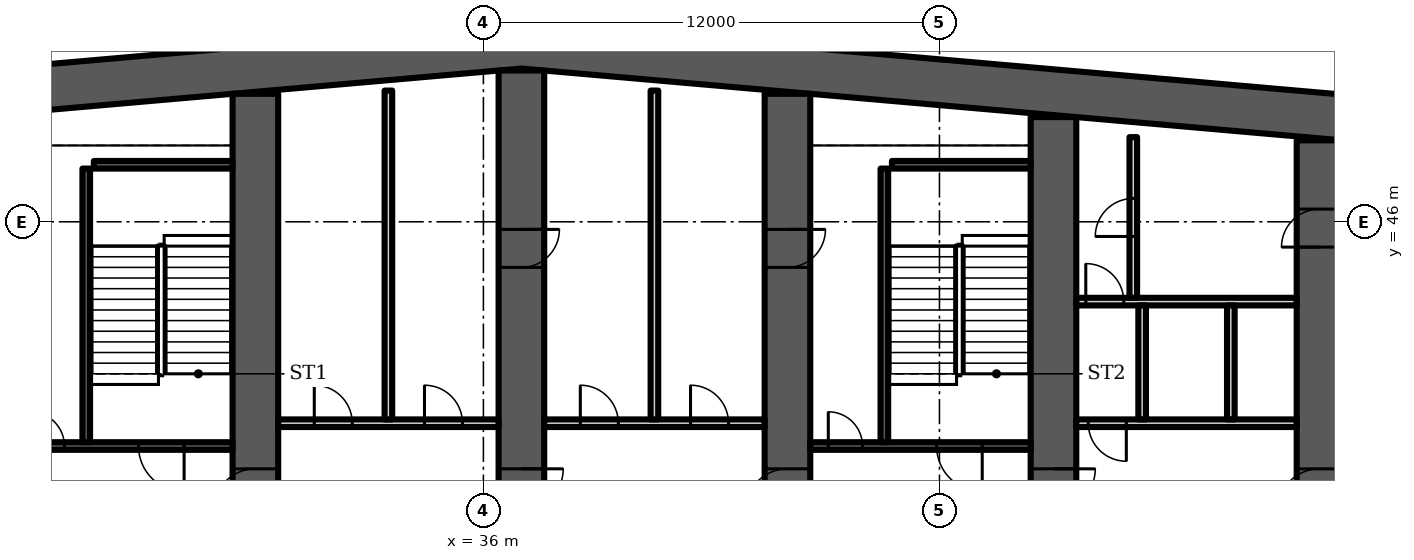
"""IFC4 building model, lengths in metres.
Left out: names, types, materials, properties, quantities, classifications, styles, units other than length and angle.
Written with IfcOpenShell. Run it as: python <this file> out.ifc"""

import sys

from ifc_helpers import new_model, si_unit, direction, frame, frame_2d, origin, place, context, subcontext, project, spatial, polyline, rectangle, outline, extrude, element, fill, save


model = new_model("IFC4")
c1 = context("Model", 3, precision=1e-05, world=origin(), true_north=direction((0.0, 1.0)))
c2 = subcontext(c1, "Body", "Model", "MODEL_VIEW")
j1 = project(units=[si_unit("LENGTHUNIT", "METRE"), si_unit("PLANEANGLEUNIT", "RADIAN")], contexts=[c1])
p1 = place(None, origin())
s1 = spatial("IfcSite", under=j1, at=p1, CompositionType="ELEMENT")
p2 = place(p1, origin())
s2 = spatial("IfcBuilding", under=s1, at=p2, CompositionType="ELEMENT")
p3 = place(p2, frame((0.0, 0.0, 91.9)))
s3 = spatial("IfcBuildingStorey", under=s2, at=p3, CompositionType="ELEMENT", Elevation=91.9)
p4 = place(p3, origin())
e1 = element("IfcWall", 1, at=p4, inside=s3, PredefinedType="SHEAR", context=c2, shape_type="SweptSolid", body=[
    extrude(outline(polyline([(9.0, 47.583), (37.0, 50.032), (65.0, 47.583), (65.0, 48.787), (37.0, 51.237), (9.0, 48.787), (9.0, 47.583)])), origin(), (0.0, 0.0, 1.0), 4.8),
])
p5 = place(p3, frame((30.0, 35.2, 0.0), z_axis=(0.0, 0.0, 1.0), x_axis=(0.0, 1.0, 0.0)))
e2 = element("IfcWall", 2, at=p5, inside=s3, PredefinedType="SHEAR", context=c2, shape_type="SweptSolid", body=[
    extrude(rectangle(XDim=14.168, YDim=1.2, at=frame_2d((7.084, 0.0))), origin(), (0.0, 0.0, 1.0), 4.8),
])
p6 = place(p5, frame((3.2, 0.0, 0.0)))
e3 = element("IfcOpeningElement", 3, at=p6, cuts=e2, PredefinedType="OPENING", context=c2, shape_type="SweptSolid", body=[
    extrude(rectangle(XDim=1.1, YDim=2.1, at=frame_2d((0.55, 1.05))), frame((0.0, 0.61, 0.0), z_axis=(0.0, -1.0, 0.0), x_axis=(1.0, 0.0, 0.0)), (0.0, 0.0, 1.0), 1.22),
])
p7 = place(p3, frame((37.0, 35.2, 0.0), z_axis=(0.0, 0.0, 1.0), x_axis=(0.0, 1.0, 0.0)))
e4 = element("IfcWall", 4, at=p7, inside=s3, PredefinedType="SHEAR", context=c2, shape_type="SweptSolid", body=[
    extrude(rectangle(XDim=14.78, YDim=1.2, at=frame_2d((7.39, 0.0))), origin(), (0.0, 0.0, 1.0), 4.8),
])
p8 = place(p7, frame((3.2, 0.0, 0.0)))
e5 = element("IfcOpeningElement", 5, at=p8, cuts=e4, PredefinedType="OPENING", context=c2, shape_type="SweptSolid", body=[
    extrude(rectangle(XDim=1.1, YDim=2.1, at=frame_2d((0.55, 1.05))), frame((0.0, 0.61, 0.0), z_axis=(0.0, -1.0, 0.0), x_axis=(1.0, 0.0, 0.0)), (0.0, 0.0, 1.0), 1.22),
])
p9 = place(p7, frame((9.6, 0.0, 0.0)))
e6 = element("IfcOpeningElement", 6, at=p9, cuts=e4, PredefinedType="OPENING", context=c2, shape_type="SweptSolid", body=[
    extrude(rectangle(XDim=1.0, YDim=2.1, at=frame_2d((0.5, 1.05))), frame((0.0, 0.61, 0.0), z_axis=(0.0, -1.0, 0.0), x_axis=(1.0, 0.0, 0.0)), (0.0, 0.0, 1.0), 1.22),
])
p10 = place(p3, frame((44.0, 35.2, 0.0), z_axis=(0.0, 0.0, 1.0), x_axis=(0.0, 1.0, 0.0)))
e7 = element("IfcWall", 7, at=p10, inside=s3, PredefinedType="SHEAR", context=c2, shape_type="SweptSolid", body=[
    extrude(rectangle(XDim=14.168, YDim=1.2, at=frame_2d((7.084, 0.0))), origin(), (0.0, 0.0, 1.0), 4.8),
])
p11 = place(p10, frame((3.2, 0.0, 0.0)))
e8 = element("IfcOpeningElement", 8, at=p11, cuts=e7, PredefinedType="OPENING", context=c2, shape_type="SweptSolid", body=[
    extrude(rectangle(XDim=1.1, YDim=2.1, at=frame_2d((0.55, 1.05))), frame((0.0, 0.61, 0.0), z_axis=(0.0, -1.0, 0.0), x_axis=(1.0, 0.0, 0.0)), (0.0, 0.0, 1.0), 1.22),
])
p12 = place(p10, frame((9.6, 0.0, 0.0)))
e9 = element("IfcOpeningElement", 9, at=p12, cuts=e7, PredefinedType="OPENING", context=c2, shape_type="SweptSolid", body=[
    extrude(rectangle(XDim=1.0, YDim=2.1, at=frame_2d((0.5, 1.05))), frame((0.0, 0.61, 0.0), z_axis=(0.0, -1.0, 0.0), x_axis=(1.0, 0.0, 0.0)), (0.0, 0.0, 1.0), 1.22),
])
p13 = place(p3, frame((51.0, 35.2, 0.0), z_axis=(0.0, 0.0, 1.0), x_axis=(0.0, 1.0, 0.0)))
e10 = element("IfcWall", 10, at=p13, inside=s3, PredefinedType="SHEAR", context=c2, shape_type="SweptSolid", body=[
    extrude(rectangle(XDim=13.555, YDim=1.2, at=frame_2d((6.778, 0.0))), origin(), (0.0, 0.0, 1.0), 4.8),
])
p14 = place(p13, frame((3.2, 0.0, 0.0)))
e11 = element("IfcOpeningElement", 11, at=p14, cuts=e10, PredefinedType="OPENING", context=c2, shape_type="SweptSolid", body=[
    extrude(rectangle(XDim=1.1, YDim=2.1, at=frame_2d((0.55, 1.05))), frame((0.0, 0.61, 0.0), z_axis=(0.0, -1.0, 0.0), x_axis=(1.0, 0.0, 0.0)), (0.0, 0.0, 1.0), 1.22),
])
p15 = place(p3, frame((58.0, 35.2, 0.0), z_axis=(0.0, 0.0, 1.0), x_axis=(0.0, 1.0, 0.0)))
e12 = element("IfcWall", 12, at=p15, inside=s3, PredefinedType="SHEAR", context=c2, shape_type="SweptSolid", body=[
    extrude(rectangle(XDim=12.943, YDim=1.2, at=frame_2d((6.471, 0.0))), origin(), (0.0, 0.0, 1.0), 4.8),
])
p16 = place(p15, frame((10.134, 0.0, 0.0)))
e13 = element("IfcOpeningElement", 13, at=p16, cuts=e12, PredefinedType="OPENING", context=c2, shape_type="SweptSolid", body=[
    extrude(rectangle(XDim=1.0, YDim=2.1, at=frame_2d((0.5, 1.05))), frame((0.0, 0.61, 0.0), z_axis=(0.0, -1.0, 0.0), x_axis=(1.0, 0.0, 0.0)), (0.0, 0.0, 1.0), 1.22),
])
p17 = place(p15, frame((3.2, 0.0, 0.0)))
e14 = element("IfcOpeningElement", 14, at=p17, cuts=e12, PredefinedType="OPENING", context=c2, shape_type="SweptSolid", body=[
    extrude(rectangle(XDim=1.1, YDim=2.1, at=frame_2d((0.55, 1.05))), frame((0.0, 0.61, 0.0), z_axis=(0.0, -1.0, 0.0), x_axis=(1.0, 0.0, 0.0)), (0.0, 0.0, 1.0), 1.22),
])
p18 = place(p3, frame((23.6, 40.1, 0.0), z_axis=(0.0, 0.0, 1.0), x_axis=(1.0, 0.0, 0.0)))
e15 = element("IfcWall", 15, at=p18, inside=s3, PredefinedType="SHEAR", context=c2, shape_type="SweptSolid", body=[
    extrude(rectangle(XDim=5.8, YDim=0.2, at=frame_2d((2.9, 0.0))), origin(), (0.0, 0.0, 1.0), 4.4),
])
p19 = place(p18, frame((3.325, 0.0, 0.0)))
e16 = element("IfcOpeningElement", 16, at=p19, cuts=e15, PredefinedType="OPENING", context=c2, shape_type="SweptSolid", body=[
    extrude(rectangle(XDim=1.2, YDim=2.1, at=frame_2d((0.6, 1.05))), frame((0.0, 0.11, 0.0), z_axis=(0.0, -1.0, 0.0), x_axis=(1.0, 0.0, 0.0)), (0.0, 0.0, 1.0), 0.22),
])
p20 = place(p18, frame((0.475, 0.0, 0.0)))
e17 = element("IfcOpeningElement", 17, at=p20, cuts=e15, PredefinedType="OPENING", context=c2, shape_type="SweptSolid", body=[
    extrude(rectangle(XDim=0.9, YDim=2.1, at=frame_2d((0.45, 1.05))), frame((0.0, 0.11, 0.0), z_axis=(0.0, -1.0, 0.0), x_axis=(1.0, 0.0, 0.0)), (0.0, 0.0, 1.0), 0.22),
])
p21 = place(p3, frame((25.55, 40.2, 0.0), z_axis=(0.0, 0.0, 1.0), x_axis=(0.0, 1.0, 0.0)))
e18 = element("IfcWall", 18, at=p21, inside=s3, PredefinedType="SHEAR", context=c2, shape_type="SweptSolid", body=[
    extrude(rectangle(XDim=7.2, YDim=0.2, at=frame_2d((3.6, 0.0))), origin(), (0.0, 0.0, 1.0), 4.4),
])
p22 = place(p3, frame((25.75, 47.5, 0.0), z_axis=(0.0, 0.0, 1.0), x_axis=(1.0, 0.0, 0.0)))
e19 = element("IfcWall", 19, at=p22, inside=s3, PredefinedType="SHEAR", context=c2, shape_type="SweptSolid", body=[
    extrude(rectangle(XDim=3.65, YDim=0.2, at=frame_2d((1.825, 0.0))), origin(), (0.0, 0.0, 1.0), 4.4),
])
p23 = place(p3, frame((30.6, 40.7, 0.0), z_axis=(0.0, 0.0, 1.0), x_axis=(1.0, 0.0, 0.0)))
e20 = element("IfcWall", 20, at=p23, inside=s3, PredefinedType="PARTITIONING", context=c2, shape_type="SweptSolid", body=[
    extrude(rectangle(XDim=5.8, YDim=0.2, at=frame_2d((2.9, 0.0))), origin(), (0.0, 0.0, 1.0), 4.4),
])
p24 = place(p23, frame((0.95, 0.0, 0.0)))
e21 = element("IfcOpeningElement", 21, at=p24, cuts=e20, PredefinedType="OPENING", context=c2, shape_type="SweptSolid", body=[
    extrude(rectangle(XDim=1.0, YDim=2.1, at=frame_2d((0.5, 1.05))), frame((0.0, 0.11, 0.0), z_axis=(0.0, -1.0, 0.0), x_axis=(1.0, 0.0, 0.0)), (0.0, 0.0, 1.0), 0.22),
])
p25 = place(p23, frame((3.85, 0.0, 0.0)))
e22 = element("IfcOpeningElement", 22, at=p25, cuts=e20, PredefinedType="OPENING", context=c2, shape_type="SweptSolid", body=[
    extrude(rectangle(XDim=1.0, YDim=2.1, at=frame_2d((0.5, 1.05))), frame((0.0, 0.11, 0.0), z_axis=(0.0, -1.0, 0.0), x_axis=(1.0, 0.0, 0.0)), (0.0, 0.0, 1.0), 0.22),
])
p26 = place(p3, frame((33.5, 40.8, 0.0), z_axis=(0.0, 0.0, 1.0), x_axis=(0.0, 1.0, 0.0)))
e23 = element("IfcWall", 23, at=p26, inside=s3, PredefinedType="PARTITIONING", context=c2, shape_type="SweptSolid", body=[
    extrude(rectangle(XDim=8.653, YDim=0.2, at=frame_2d((4.326, 0.0))), origin(), (0.0, 0.0, 1.0), 4.4),
])
p27 = place(p3, frame((37.6, 40.7, 0.0), z_axis=(0.0, 0.0, 1.0), x_axis=(1.0, 0.0, 0.0)))
e24 = element("IfcWall", 24, at=p27, inside=s3, PredefinedType="PARTITIONING", context=c2, shape_type="SweptSolid", body=[
    extrude(rectangle(XDim=5.8, YDim=0.2, at=frame_2d((2.9, 0.0))), origin(), (0.0, 0.0, 1.0), 4.4),
])
p28 = place(p27, frame((0.95, 0.0, 0.0)))
e25 = element("IfcOpeningElement", 25, at=p28, cuts=e24, PredefinedType="OPENING", context=c2, shape_type="SweptSolid", body=[
    extrude(rectangle(XDim=1.0, YDim=2.1, at=frame_2d((0.5, 1.05))), frame((0.0, 0.11, 0.0), z_axis=(0.0, -1.0, 0.0), x_axis=(1.0, 0.0, 0.0)), (0.0, 0.0, 1.0), 0.22),
])
p29 = place(p27, frame((3.85, 0.0, 0.0)))
e26 = element("IfcOpeningElement", 26, at=p29, cuts=e24, PredefinedType="OPENING", context=c2, shape_type="SweptSolid", body=[
    extrude(rectangle(XDim=1.0, YDim=2.1, at=frame_2d((0.5, 1.05))), frame((0.0, 0.11, 0.0), z_axis=(0.0, -1.0, 0.0), x_axis=(1.0, 0.0, 0.0)), (0.0, 0.0, 1.0), 0.22),
])
p30 = place(p3, frame((40.5, 40.8, 0.0), z_axis=(0.0, 0.0, 1.0), x_axis=(0.0, 1.0, 0.0)))
e27 = element("IfcWall", 27, at=p30, inside=s3, PredefinedType="PARTITIONING", context=c2, shape_type="SweptSolid", body=[
    extrude(rectangle(XDim=8.653, YDim=0.2, at=frame_2d((4.326, 0.0))), origin(), (0.0, 0.0, 1.0), 4.4),
])
p31 = place(p3, frame((44.6, 40.1, 0.0), z_axis=(0.0, 0.0, 1.0), x_axis=(1.0, 0.0, 0.0)))
e28 = element("IfcWall", 28, at=p31, inside=s3, PredefinedType="SHEAR", context=c2, shape_type="SweptSolid", body=[
    extrude(rectangle(XDim=5.8, YDim=0.2, at=frame_2d((2.9, 0.0))), origin(), (0.0, 0.0, 1.0), 4.4),
])
p32 = place(p31, frame((3.325, 0.0, 0.0)))
e29 = element("IfcOpeningElement", 29, at=p32, cuts=e28, PredefinedType="OPENING", context=c2, shape_type="SweptSolid", body=[
    extrude(rectangle(XDim=1.2, YDim=2.1, at=frame_2d((0.6, 1.05))), frame((0.0, 0.11, 0.0), z_axis=(0.0, -1.0, 0.0), x_axis=(1.0, 0.0, 0.0)), (0.0, 0.0, 1.0), 0.22),
])
p33 = place(p31, frame((0.475, 0.0, 0.0)))
e30 = element("IfcOpeningElement", 30, at=p33, cuts=e28, PredefinedType="OPENING", context=c2, shape_type="SweptSolid", body=[
    extrude(rectangle(XDim=0.9, YDim=2.1, at=frame_2d((0.45, 1.05))), frame((0.0, 0.11, 0.0), z_axis=(0.0, -1.0, 0.0), x_axis=(1.0, 0.0, 0.0)), (0.0, 0.0, 1.0), 0.22),
])
p34 = place(p3, frame((46.55, 40.2, 0.0), z_axis=(0.0, 0.0, 1.0), x_axis=(0.0, 1.0, 0.0)))
e31 = element("IfcWall", 31, at=p34, inside=s3, PredefinedType="SHEAR", context=c2, shape_type="SweptSolid", body=[
    extrude(rectangle(XDim=7.2, YDim=0.2, at=frame_2d((3.6, 0.0))), origin(), (0.0, 0.0, 1.0), 4.4),
])
p35 = place(p3, frame((46.75, 47.5, 0.0), z_axis=(0.0, 0.0, 1.0), x_axis=(1.0, 0.0, 0.0)))
e32 = element("IfcWall", 32, at=p35, inside=s3, PredefinedType="SHEAR", context=c2, shape_type="SweptSolid", body=[
    extrude(rectangle(XDim=3.65, YDim=0.2, at=frame_2d((1.825, 0.0))), origin(), (0.0, 0.0, 1.0), 4.4),
])
p36 = place(p3, frame((51.6, 40.7, 0.0), z_axis=(0.0, 0.0, 1.0), x_axis=(1.0, 0.0, 0.0)))
e33 = element("IfcWall", 33, at=p36, inside=s3, PredefinedType="PARTITIONING", context=c2, shape_type="SweptSolid", body=[
    extrude(rectangle(XDim=5.8, YDim=0.2, at=frame_2d((2.9, 0.0))), origin(), (0.0, 0.0, 1.0), 4.4),
])
p37 = place(p36, frame((0.317, 0.0, 0.0)))
e34 = element("IfcOpeningElement", 34, at=p37, cuts=e33, PredefinedType="OPENING", context=c2, shape_type="SweptSolid", body=[
    extrude(rectangle(XDim=1.0, YDim=2.1, at=frame_2d((0.5, 1.05))), frame((0.0, 0.11, 0.0), z_axis=(0.0, -1.0, 0.0), x_axis=(1.0, 0.0, 0.0)), (0.0, 0.0, 1.0), 0.22),
])
p38 = place(p3, frame((51.6, 43.9, 0.0), z_axis=(0.0, 0.0, 1.0), x_axis=(1.0, 0.0, 0.0)))
e35 = element("IfcWall", 35, at=p38, inside=s3, PredefinedType="PARTITIONING", context=c2, shape_type="SweptSolid", body=[
    extrude(rectangle(XDim=5.8, YDim=0.2, at=frame_2d((2.9, 0.0))), origin(), (0.0, 0.0, 1.0), 4.4),
])
p39 = place(p38, frame((0.25, 0.0, 0.0)))
e36 = element("IfcOpeningElement", 36, at=p39, cuts=e35, PredefinedType="OPENING", context=c2, shape_type="SweptSolid", body=[
    extrude(rectangle(XDim=1.0, YDim=2.1, at=frame_2d((0.5, 1.05))), frame((0.0, 0.11, 0.0), z_axis=(0.0, -1.0, 0.0), x_axis=(1.0, 0.0, 0.0)), (0.0, 0.0, 1.0), 0.22),
])
p40 = place(p3, origin())
e37 = element("IfcWall", 37, at=p40, inside=s3, PredefinedType="PARTITIONING", context=c2, shape_type="SweptSolid", body=[
    extrude(outline(polyline([(53.233, 40.8), (53.233, 43.8), (53.433, 43.8), (53.433, 40.8), (53.233, 40.8)])), origin(), (0.0, 0.0, 1.0), 4.4),
])
p41 = place(p3, origin())
e38 = element("IfcWall", 38, at=p41, inside=s3, PredefinedType="PARTITIONING", context=c2, shape_type="SweptSolid", body=[
    extrude(outline(polyline([(55.567, 40.8), (55.567, 43.8), (55.767, 43.8), (55.767, 40.8), (55.567, 40.8)])), origin(), (0.0, 0.0, 1.0), 4.4),
])
p42 = place(p3, frame((53.1, 44.0, 0.0), z_axis=(0.0, 0.0, 1.0), x_axis=(0.0, 1.0, 0.0)))
e39 = element("IfcWall", 39, at=p42, inside=s3, PredefinedType="PARTITIONING", context=c2, shape_type="SweptSolid", body=[
    extrude(rectangle(XDim=4.228, YDim=0.2, at=frame_2d((2.114, 0.0))), origin(), (0.0, 0.0, 1.0), 4.4),
])
p43 = place(p42, frame((1.614, 0.0, 0.0)))
e40 = element("IfcOpeningElement", 40, at=p43, cuts=e39, PredefinedType="OPENING", context=c2, shape_type="SweptSolid", body=[
    extrude(rectangle(XDim=1.0, YDim=2.1, at=frame_2d((0.5, 1.05))), frame((0.0, 0.11, 0.0), z_axis=(0.0, -1.0, 0.0), x_axis=(1.0, 0.0, 0.0)), (0.0, 0.0, 1.0), 0.22),
])
p44 = place(p19, origin())
e41 = element("IfcDoor", 41, at=p44, inside=s3, OperationType="SINGLE_SWING_RIGHT", PredefinedType="DOOR", context=c2, shape_type="SweptSolid", body=[
    extrude(rectangle(XDim=1.2, YDim=2.1, at=frame_2d((0.6, 1.05))), frame((0.0, 0.025, 0.0), z_axis=(0.0, -1.0, 0.0), x_axis=(1.0, 0.0, 0.0)), (0.0, 0.0, 1.0), 0.05),
])
fill(e16, e41)
p45 = place(p20, origin())
e42 = element("IfcDoor", 42, at=p45, inside=s3, OperationType="SINGLE_SWING_LEFT", PredefinedType="DOOR", context=c2, shape_type="SweptSolid", body=[
    extrude(rectangle(XDim=0.9, YDim=2.1, at=frame_2d((0.45, 1.05))), frame((0.0, 0.025, 0.0), z_axis=(0.0, -1.0, 0.0), x_axis=(1.0, 0.0, 0.0)), (0.0, 0.0, 1.0), 0.05),
])
fill(e17, e42)
p46 = place(p24, origin())
e43 = element("IfcDoor", 43, at=p46, inside=s3, OperationType="SINGLE_SWING_LEFT", PredefinedType="DOOR", context=c2, shape_type="SweptSolid", body=[
    extrude(rectangle(XDim=1.0, YDim=2.1, at=frame_2d((0.5, 1.05))), frame((0.0, 0.025, 0.0), z_axis=(0.0, -1.0, 0.0), x_axis=(1.0, 0.0, 0.0)), (0.0, 0.0, 1.0), 0.05),
])
fill(e21, e43)
p47 = place(p25, origin())
e44 = element("IfcDoor", 44, at=p47, inside=s3, OperationType="SINGLE_SWING_LEFT", PredefinedType="DOOR", context=c2, shape_type="SweptSolid", body=[
    extrude(rectangle(XDim=1.0, YDim=2.1, at=frame_2d((0.5, 1.05))), frame((0.0, 0.025, 0.0), z_axis=(0.0, -1.0, 0.0), x_axis=(1.0, 0.0, 0.0)), (0.0, 0.0, 1.0), 0.05),
])
fill(e22, e44)
p48 = place(p28, origin())
e45 = element("IfcDoor", 45, at=p48, inside=s3, OperationType="SINGLE_SWING_LEFT", PredefinedType="DOOR", context=c2, shape_type="SweptSolid", body=[
    extrude(rectangle(XDim=1.0, YDim=2.1, at=frame_2d((0.5, 1.05))), frame((0.0, 0.025, 0.0), z_axis=(0.0, -1.0, 0.0), x_axis=(1.0, 0.0, 0.0)), (0.0, 0.0, 1.0), 0.05),
])
fill(e25, e45)
p49 = place(p29, origin())
e46 = element("IfcDoor", 46, at=p49, inside=s3, OperationType="SINGLE_SWING_LEFT", PredefinedType="DOOR", context=c2, shape_type="SweptSolid", body=[
    extrude(rectangle(XDim=1.0, YDim=2.1, at=frame_2d((0.5, 1.05))), frame((0.0, 0.025, 0.0), z_axis=(0.0, -1.0, 0.0), x_axis=(1.0, 0.0, 0.0)), (0.0, 0.0, 1.0), 0.05),
])
fill(e26, e46)
p50 = place(p32, origin())
e47 = element("IfcDoor", 47, at=p50, inside=s3, OperationType="SINGLE_SWING_RIGHT", PredefinedType="DOOR", context=c2, shape_type="SweptSolid", body=[
    extrude(rectangle(XDim=1.2, YDim=2.1, at=frame_2d((0.6, 1.05))), frame((0.0, 0.025, 0.0), z_axis=(0.0, -1.0, 0.0), x_axis=(1.0, 0.0, 0.0)), (0.0, 0.0, 1.0), 0.05),
])
fill(e29, e47)
p51 = place(p33, origin())
e48 = element("IfcDoor", 48, at=p51, inside=s3, OperationType="SINGLE_SWING_LEFT", PredefinedType="DOOR", context=c2, shape_type="SweptSolid", body=[
    extrude(rectangle(XDim=0.9, YDim=2.1, at=frame_2d((0.45, 1.05))), frame((0.0, 0.025, 0.0), z_axis=(0.0, -1.0, 0.0), x_axis=(1.0, 0.0, 0.0)), (0.0, 0.0, 1.0), 0.05),
])
fill(e30, e48)
p52 = place(p37, origin())
e49 = element("IfcDoor", 49, at=p52, inside=s3, OperationType="SINGLE_SWING_RIGHT", PredefinedType="DOOR", context=c2, shape_type="SweptSolid", body=[
    extrude(rectangle(XDim=1.0, YDim=2.1, at=frame_2d((0.5, 1.05))), frame((0.0, 0.025, 0.0), z_axis=(0.0, -1.0, 0.0), x_axis=(1.0, 0.0, 0.0)), (0.0, 0.0, 1.0), 0.05),
])
fill(e34, e49)
p53 = place(p39, origin())
e50 = element("IfcDoor", 50, at=p53, inside=s3, OperationType="SINGLE_SWING_LEFT", PredefinedType="DOOR", context=c2, shape_type="SweptSolid", body=[
    extrude(rectangle(XDim=1.0, YDim=2.1, at=frame_2d((0.5, 1.05))), frame((0.0, 0.025, 0.0), z_axis=(0.0, -1.0, 0.0), x_axis=(1.0, 0.0, 0.0)), (0.0, 0.0, 1.0), 0.05),
])
fill(e36, e50)
p54 = place(p43, origin())
e51 = element("IfcDoor", 51, at=p54, inside=s3, OperationType="SINGLE_SWING_LEFT", PredefinedType="DOOR", context=c2, shape_type="SweptSolid", body=[
    extrude(rectangle(XDim=1.0, YDim=2.1, at=frame_2d((0.5, 1.05))), frame((0.0, 0.025, 0.0), z_axis=(0.0, -1.0, 0.0), x_axis=(1.0, 0.0, 0.0)), (0.0, 0.0, 1.0), 0.05),
])
fill(e40, e51)
p55 = place(p16, origin())
e52 = element("IfcDoor", 52, at=p55, inside=s3, OperationType="SINGLE_SWING_LEFT", PredefinedType="DOOR", context=c2, shape_type="SweptSolid", body=[
    extrude(rectangle(XDim=1.0, YDim=2.1, at=frame_2d((0.5, 1.05))), frame((0.0, 0.6, 0.0), z_axis=(0.0, -1.0, 0.0), x_axis=(1.0, 0.0, 0.0)), (0.0, 0.0, 1.0), 1.199),
])
fill(e13, e52)
p56 = place(p6, origin())
e53 = element("IfcDoor", 53, at=p56, inside=s3, OperationType="SINGLE_SWING_LEFT", PredefinedType="DOOR", context=c2, shape_type="SweptSolid", body=[
    extrude(rectangle(XDim=1.1, YDim=2.1, at=frame_2d((0.55, 1.05))), frame((0.0, 0.025, 0.0), z_axis=(0.0, -1.0, 0.0), x_axis=(1.0, 0.0, 0.0)), (0.0, 0.0, 1.0), 0.05),
])
fill(e3, e53)
p57 = place(p8, origin())
e54 = element("IfcDoor", 54, at=p57, inside=s3, OperationType="SINGLE_SWING_RIGHT", PredefinedType="DOOR", context=c2, shape_type="SweptSolid", body=[
    extrude(rectangle(XDim=1.1, YDim=2.1, at=frame_2d((0.55, 1.05))), frame((0.0, 0.025, 0.0), z_axis=(0.0, -1.0, 0.0), x_axis=(1.0, 0.0, 0.0)), (0.0, 0.0, 1.0), 0.05),
])
fill(e5, e54)
p58 = place(p9, origin())
e55 = element("IfcDoor", 55, at=p58, inside=s3, OperationType="SINGLE_SWING_RIGHT", PredefinedType="DOOR", context=c2, shape_type="SweptSolid", body=[
    extrude(rectangle(XDim=1.0, YDim=2.1, at=frame_2d((0.5, 1.05))), frame((0.0, 0.6, 0.0), z_axis=(0.0, -1.0, 0.0), x_axis=(1.0, 0.0, 0.0)), (0.0, 0.0, 1.0), 1.199),
])
fill(e6, e55)
p59 = place(p11, origin())
e56 = element("IfcDoor", 56, at=p59, inside=s3, OperationType="SINGLE_SWING_LEFT", PredefinedType="DOOR", context=c2, shape_type="SweptSolid", body=[
    extrude(rectangle(XDim=1.1, YDim=2.1, at=frame_2d((0.55, 1.05))), frame((0.0, 0.025, 0.0), z_axis=(0.0, -1.0, 0.0), x_axis=(1.0, 0.0, 0.0)), (0.0, 0.0, 1.0), 0.05),
])
fill(e8, e56)
p60 = place(p12, origin())
e57 = element("IfcDoor", 57, at=p60, inside=s3, OperationType="SINGLE_SWING_RIGHT", PredefinedType="DOOR", context=c2, shape_type="SweptSolid", body=[
    extrude(rectangle(XDim=1.0, YDim=2.1, at=frame_2d((0.5, 1.05))), frame((0.0, 0.6, 0.0), z_axis=(0.0, -1.0, 0.0), x_axis=(1.0, 0.0, 0.0)), (0.0, 0.0, 1.0), 1.199),
])
fill(e9, e57)
p61 = place(p14, origin())
e58 = element("IfcDoor", 58, at=p61, inside=s3, OperationType="SINGLE_SWING_RIGHT", PredefinedType="DOOR", context=c2, shape_type="SweptSolid", body=[
    extrude(rectangle(XDim=1.1, YDim=2.1, at=frame_2d((0.55, 1.05))), frame((0.0, 0.025, 0.0), z_axis=(0.0, -1.0, 0.0), x_axis=(1.0, 0.0, 0.0)), (0.0, 0.0, 1.0), 0.05),
])
fill(e11, e58)
p62 = place(p17, origin())
e59 = element("IfcDoor", 59, at=p62, inside=s3, OperationType="SINGLE_SWING_LEFT", PredefinedType="DOOR", context=c2, shape_type="SweptSolid", body=[
    extrude(rectangle(XDim=1.1, YDim=2.1, at=frame_2d((0.55, 1.05))), frame((0.0, 0.025, 0.0), z_axis=(0.0, -1.0, 0.0), x_axis=(1.0, 0.0, 0.0)), (0.0, 0.0, 1.0), 0.05),
])
fill(e14, e59)
save(model, sys.argv[1])
